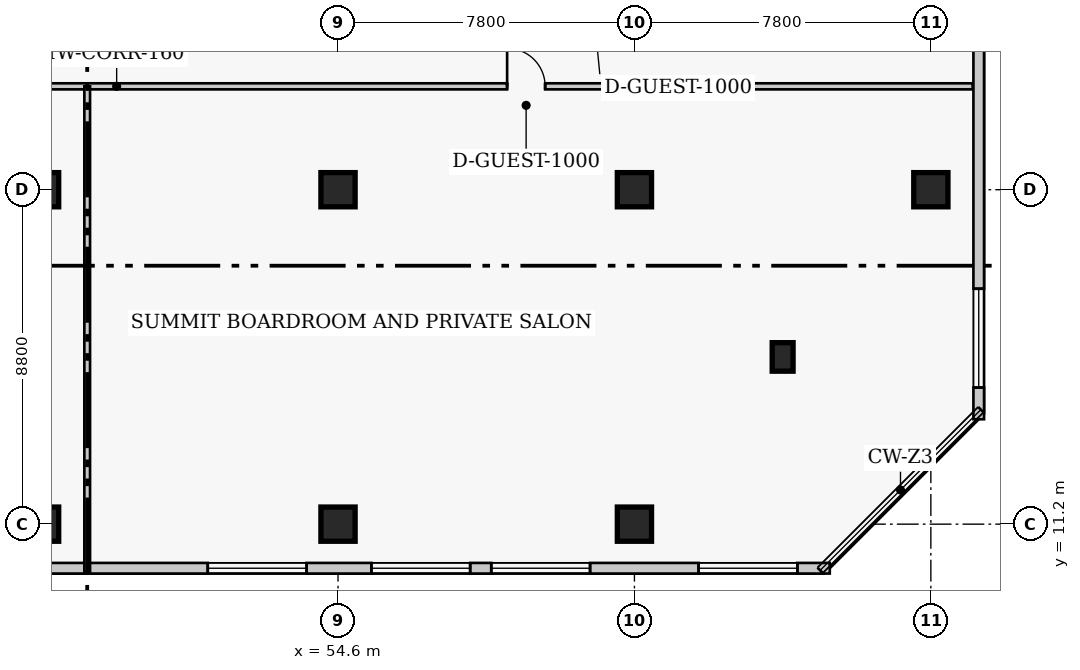
"""IFC4 building model, lengths in metres.
Left out: names, types, materials, properties, quantities, classifications, styles, units other than length and angle.
Written with IfcOpenShell. Run it as: python <this file> out.ifc"""

import sys

from ifc_helpers import new_model, si_unit, direction, frame, frame_2d, origin, origin_2d, place, context, subcontext, project, spatial, rectangle, extrude, element, fill, save


model = new_model("IFC4")
c1 = context("Model", 3, precision=1e-05, world=origin(), true_north=direction((0.0, 1.0)))
c2 = subcontext(c1, "Body", "Model", "MODEL_VIEW")
j1 = project(units=[si_unit("LENGTHUNIT", "METRE"), si_unit("PLANEANGLEUNIT", "RADIAN")], contexts=[c1])
p1 = place(None, origin())
s1 = spatial("IfcSite", under=j1, at=p1, CompositionType="ELEMENT")
p2 = place(p1, origin())
s2 = spatial("IfcBuilding", under=s1, at=p2, CompositionType="ELEMENT")
p3 = place(p2, frame((0.0, 0.0, 231.9)))
s3 = spatial("IfcBuildingStorey", under=s2, at=p3, CompositionType="ELEMENT", Elevation=231.9)
for number, where, z_axis, x_axis in (
    (1, (46.8, 11.2, 0.0), (0.0, 0.0, 1.0), (1.0, 0.0, 0.0)),
    (2, (46.8, 20.0, 0.0), (0.0, 0.0, 1.0), (1.0, 0.0, 0.0)),
    (3, (54.6, 11.2, 0.0), (0.0, 0.0, 1.0), (1.0, 0.0, 0.0)),
    (4, (54.6, 20.0, 0.0), (0.0, 0.0, 1.0), (1.0, 0.0, 0.0)),
    (5, (62.4, 11.2, 0.0), (0.0, 0.0, 1.0), (1.0, 0.0, 0.0)),
    (6, (62.4, 20.0, 0.0), (0.0, 0.0, 1.0), (1.0, 0.0, 0.0)),
    (7, (70.2, 20.0, 0.0), (0.0, 0.0, 1.0), (1.0, 0.0, 0.0)),
):
    element("IfcColumn", number, at=place(p3, frame(where, z_axis=z_axis, x_axis=x_axis)), inside=s3, PredefinedType="COLUMN", context=c2, shape_type="SweptSolid", body=[
        extrude(rectangle(XDim=0.9, YDim=0.9, at=origin_2d()), origin(), (0.0, 0.0, 1.0), 4.6),
    ])
p4 = place(p3, frame((66.3, 15.6, 0.0), z_axis=(0.0, 0.0, 1.0), x_axis=(1.0, 0.0, 0.0)))
e8 = element("IfcColumn", 8, at=p4, inside=s3, PredefinedType="PILASTER", context=c2, shape_type="SweptSolid", body=[
    extrude(rectangle(XDim=0.55, YDim=0.75, at=origin_2d()), origin(), (0.0, 0.0, 1.0), 4.6),
])
p5 = place(p3, frame((41.71, 10.04, 0.0), z_axis=(0.0, 0.0, 1.0), x_axis=(1.0, 0.0, 0.0)))
e9 = element("IfcWall", 9, at=p5, inside=s3, PredefinedType="SOLIDWALL", context=c2, shape_type="SweptSolid", body=[
    extrude(rectangle(XDim=25.83, YDim=0.28, at=frame_2d((12.915, 0.0))), origin(), (0.0, 0.0, 1.0), 4.35),
])
p6 = place(p5, frame((0.853, 0.0, 0.65)))
e10 = element("IfcOpeningElement", 10, at=p6, cuts=e9, PredefinedType="OPENING", context=c2, shape_type="SweptSolid", body=[
    extrude(rectangle(XDim=2.6, YDim=2.2, at=frame_2d((1.3, 1.1))), frame((0.0, 0.15, 0.0), z_axis=(0.0, -1.0, 0.0), x_axis=(1.0, 0.0, 0.0)), (0.0, 0.0, 1.0), 0.3),
])
p7 = place(p5, frame((9.462, 0.0, 0.65)))
e11 = element("IfcOpeningElement", 11, at=p7, cuts=e9, PredefinedType="OPENING", context=c2, shape_type="SweptSolid", body=[
    extrude(rectangle(XDim=2.6, YDim=2.2, at=frame_2d((1.3, 1.1))), frame((0.0, 0.15, 0.0), z_axis=(0.0, -1.0, 0.0), x_axis=(1.0, 0.0, 0.0)), (0.0, 0.0, 1.0), 0.3),
])
p8 = place(p5, frame((13.768, 0.0, 0.65)))
e12 = element("IfcOpeningElement", 12, at=p8, cuts=e9, PredefinedType="OPENING", context=c2, shape_type="SweptSolid", body=[
    extrude(rectangle(XDim=2.6, YDim=2.2, at=frame_2d((1.3, 1.1))), frame((0.0, 0.15, 0.0), z_axis=(0.0, -1.0, 0.0), x_axis=(1.0, 0.0, 0.0)), (0.0, 0.0, 1.0), 0.3),
])
p9 = place(p5, frame((16.923, 0.0, 0.65)))
e13 = element("IfcOpeningElement", 13, at=p9, cuts=e9, PredefinedType="OPENING", context=c2, shape_type="SweptSolid", body=[
    extrude(rectangle(XDim=2.6, YDim=2.2, at=frame_2d((1.3, 1.1))), frame((0.0, 0.15, 0.0), z_axis=(0.0, -1.0, 0.0), x_axis=(1.0, 0.0, 0.0)), (0.0, 0.0, 1.0), 0.3),
])
p10 = place(p5, frame((22.377, 0.0, 0.65)))
e14 = element("IfcOpeningElement", 14, at=p10, cuts=e9, PredefinedType="OPENING", context=c2, shape_type="SweptSolid", body=[
    extrude(rectangle(XDim=2.6, YDim=2.2, at=frame_2d((1.3, 1.1))), frame((0.0, 0.15, 0.0), z_axis=(0.0, -1.0, 0.0), x_axis=(1.0, 0.0, 0.0)), (0.0, 0.0, 1.0), 0.3),
])
p11 = place(p3, frame((71.46, 13.96, 0.0), z_axis=(0.0, 0.0, 1.0), x_axis=(0.0, 1.0, 0.0)))
e15 = element("IfcWall", 15, at=p11, inside=s3, PredefinedType="SOLIDWALL", context=c2, shape_type="SweptSolid", body=[
    extrude(rectangle(XDim=29.88, YDim=0.28, at=frame_2d((14.94, 0.0))), origin(), (0.0, 0.0, 1.0), 4.35),
])
p12 = place(p11, frame((0.834, 0.0, 0.65)))
e16 = element("IfcOpeningElement", 16, at=p12, cuts=e15, PredefinedType="OPENING", context=c2, shape_type="SweptSolid", body=[
    extrude(rectangle(XDim=2.6, YDim=2.2, at=frame_2d((1.3, 1.1))), frame((0.0, 0.15, 0.0), z_axis=(0.0, -1.0, 0.0), x_axis=(1.0, 0.0, 0.0)), (0.0, 0.0, 1.0), 0.3),
])
p13 = place(p11, frame((17.909, 0.0, 0.65)))
e17 = element("IfcOpeningElement", 17, at=p13, cuts=e15, PredefinedType="OPENING", context=c2, shape_type="SweptSolid", body=[
    extrude(rectangle(XDim=2.6, YDim=2.2, at=frame_2d((1.3, 1.1))), frame((0.0, 0.15, 0.0), z_axis=(0.0, -1.0, 0.0), x_axis=(1.0, 0.0, 0.0)), (0.0, 0.0, 1.0), 0.3),
])
p14 = place(p11, frame((21.027, 0.0, 0.65)))
e18 = element("IfcOpeningElement", 18, at=p14, cuts=e15, PredefinedType="OPENING", context=c2, shape_type="SweptSolid", body=[
    extrude(rectangle(XDim=2.6, YDim=2.2, at=frame_2d((1.3, 1.1))), frame((0.0, 0.15, 0.0), z_axis=(0.0, -1.0, 0.0), x_axis=(1.0, 0.0, 0.0)), (0.0, 0.0, 1.0), 0.3),
])
p15 = place(p11, frame((26.446, 0.0, 0.65)))
e19 = element("IfcOpeningElement", 19, at=p15, cuts=e15, PredefinedType="OPENING", context=c2, shape_type="SweptSolid", body=[
    extrude(rectangle(XDim=2.6, YDim=2.2, at=frame_2d((1.3, 1.1))), frame((0.0, 0.15, 0.0), z_axis=(0.0, -1.0, 0.0), x_axis=(1.0, 0.0, 0.0)), (0.0, 0.0, 1.0), 0.3),
])
p16 = place(p3, frame((6.7, 22.72, 0.0), z_axis=(0.0, 0.0, 1.0), x_axis=(1.0, 0.0, 0.0)))
e20 = element("IfcWall", 20, at=p16, inside=s3, PredefinedType="PARTITIONING", context=c2, shape_type="SweptSolid", body=[
    extrude(rectangle(XDim=64.6, YDim=0.16, at=frame_2d((32.3, 0.0))), origin(), (0.0, 0.0, 1.0), 4.35),
])
p17 = place(p16, frame((10.25, 0.0, 0.0)))
e21 = element("IfcOpeningElement", 21, at=p17, cuts=e20, PredefinedType="OPENING", context=c2, shape_type="SweptSolid", body=[
    extrude(rectangle(XDim=1.0, YDim=2.15, at=frame_2d((0.5, 1.075))), frame((0.0, 0.09, 0.0), z_axis=(0.0, -1.0, 0.0), x_axis=(1.0, 0.0, 0.0)), (0.0, 0.0, 1.0), 0.18),
])
p18 = place(p16, frame((30.8, 0.0, 0.0)))
e22 = element("IfcOpeningElement", 22, at=p18, cuts=e20, PredefinedType="OPENING", context=c2, shape_type="SweptSolid", body=[
    extrude(rectangle(XDim=1.0, YDim=2.15, at=frame_2d((0.5, 1.075))), frame((0.0, 0.09, 0.0), z_axis=(0.0, -1.0, 0.0), x_axis=(1.0, 0.0, 0.0)), (0.0, 0.0, 1.0), 0.18),
])
p19 = place(p16, frame((52.35, 0.0, 0.0)))
e23 = element("IfcOpeningElement", 23, at=p19, cuts=e20, PredefinedType="OPENING", context=c2, shape_type="SweptSolid", body=[
    extrude(rectangle(XDim=1.0, YDim=2.15, at=frame_2d((0.5, 1.075))), frame((0.0, 0.09, 0.0), z_axis=(0.0, -1.0, 0.0), x_axis=(1.0, 0.0, 0.0)), (0.0, 0.0, 1.0), 0.18),
])
p20 = place(p3, frame((48.0, 9.92, 0.0), z_axis=(0.0, 0.0, 1.0), x_axis=(0.0, 1.0, 0.0)))
e24 = element("IfcWall", 24, at=p20, inside=s3, PredefinedType="PARTITIONING", context=c2, shape_type="SweptSolid", body=[
    extrude(rectangle(XDim=12.8, YDim=0.15, at=frame_2d((6.4, 0.0))), origin(), (0.0, 0.0, 1.0), 4.35),
])
p21 = place(p7, origin())
e25 = element("IfcWindow", 25, at=p21, inside=s3, PartitioningType="SINGLE_PANEL", PredefinedType="WINDOW", context=c2, shape_type="SweptSolid", body=[
    extrude(rectangle(XDim=2.6, YDim=2.2, at=frame_2d((1.3, 1.1))), frame((0.0, 0.03, 0.0), z_axis=(0.0, -1.0, 0.0), x_axis=(1.0, 0.0, 0.0)), (0.0, 0.0, 1.0), 0.06),
])
fill(e11, e25)
p22 = place(p8, origin())
e26 = element("IfcWindow", 26, at=p22, inside=s3, PartitioningType="SINGLE_PANEL", PredefinedType="WINDOW", context=c2, shape_type="SweptSolid", body=[
    extrude(rectangle(XDim=2.6, YDim=2.2, at=frame_2d((1.3, 1.1))), frame((0.0, 0.03, 0.0), z_axis=(0.0, -1.0, 0.0), x_axis=(1.0, 0.0, 0.0)), (0.0, 0.0, 1.0), 0.06),
])
fill(e12, e26)
p23 = place(p9, origin())
e27 = element("IfcWindow", 27, at=p23, inside=s3, PartitioningType="SINGLE_PANEL", PredefinedType="WINDOW", context=c2, shape_type="SweptSolid", body=[
    extrude(rectangle(XDim=2.6, YDim=2.2, at=frame_2d((1.3, 1.1))), frame((0.0, 0.03, 0.0), z_axis=(0.0, -1.0, 0.0), x_axis=(1.0, 0.0, 0.0)), (0.0, 0.0, 1.0), 0.06),
])
fill(e13, e27)
p24 = place(p10, origin())
e28 = element("IfcWindow", 28, at=p24, inside=s3, PartitioningType="SINGLE_PANEL", PredefinedType="WINDOW", context=c2, shape_type="SweptSolid", body=[
    extrude(rectangle(XDim=2.6, YDim=2.2, at=frame_2d((1.3, 1.1))), frame((0.0, 0.03, 0.0), z_axis=(0.0, -1.0, 0.0), x_axis=(1.0, 0.0, 0.0)), (0.0, 0.0, 1.0), 0.06),
])
fill(e14, e28)
p25 = place(p12, origin())
e29 = element("IfcWindow", 29, at=p25, inside=s3, PartitioningType="SINGLE_PANEL", PredefinedType="WINDOW", context=c2, shape_type="SweptSolid", body=[
    extrude(rectangle(XDim=2.6, YDim=2.2, at=frame_2d((1.3, 1.1))), frame((0.0, 0.03, 0.0), z_axis=(0.0, -1.0, 0.0), x_axis=(1.0, 0.0, 0.0)), (0.0, 0.0, 1.0), 0.06),
])
fill(e16, e29)
p26 = place(p19, origin())
e30 = element("IfcDoor", 30, at=p26, inside=s3, OperationType="SINGLE_SWING_LEFT", PredefinedType="DOOR", context=c2, shape_type="SweptSolid", body=[
    extrude(rectangle(XDim=1.0, YDim=2.15, at=frame_2d((0.5, 1.075))), frame((0.0, 0.025, 0.0), z_axis=(0.0, -1.0, 0.0), x_axis=(1.0, 0.0, 0.0)), (0.0, 0.0, 1.0), 0.05),
])
fill(e23, e30)
save(model, sys.argv[1])
